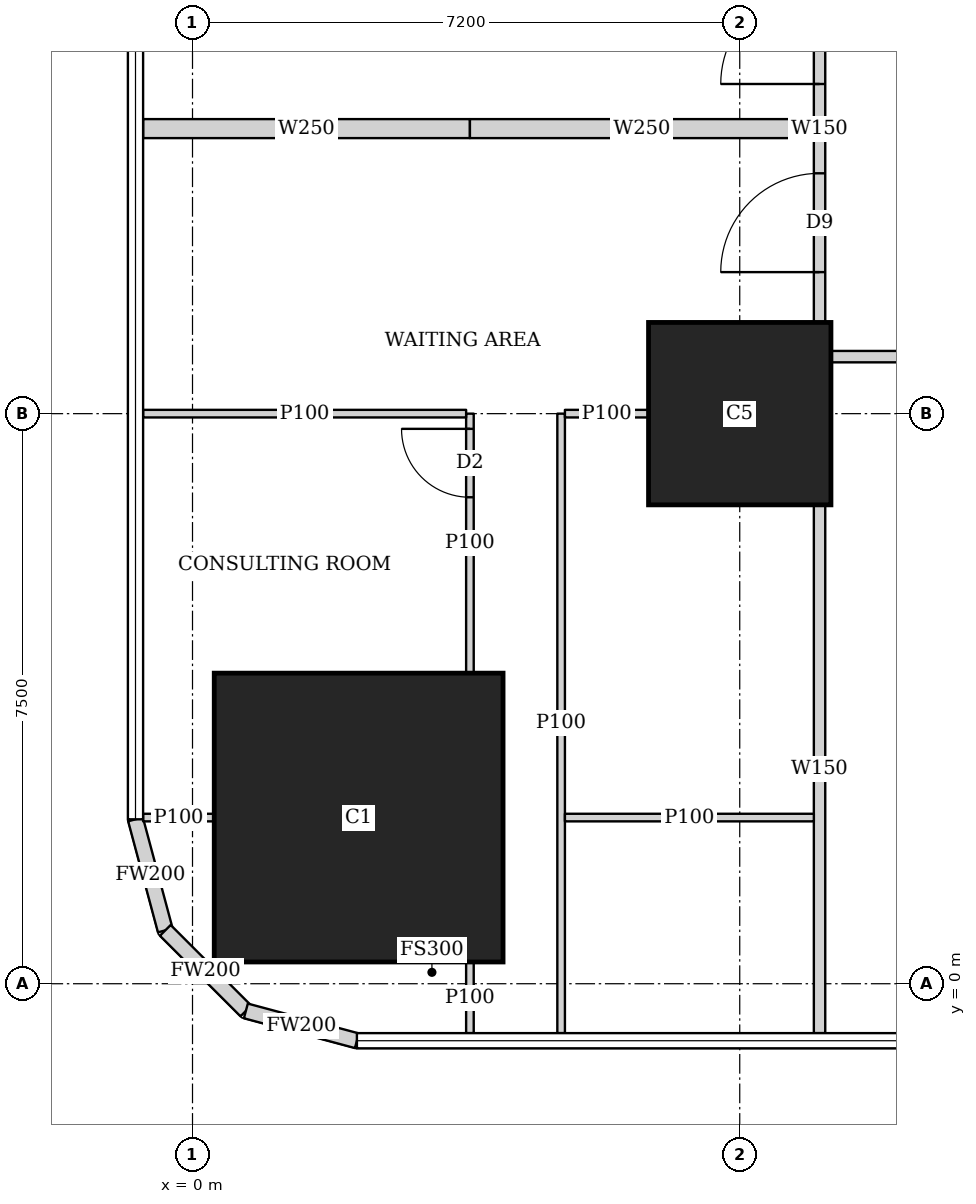
"""IFC4 building model, lengths in metres.
Left out: names, types, materials, properties, quantities, classifications, styles, units other than length and angle.
Written with IfcOpenShell. Run it as: python <this file> out.ifc"""

import sys

from ifc_helpers import new_model, si_unit, direction, frame, frame_2d, origin, origin_2d, place, context, subcontext, project, spatial, rectangle, extrude, element, fill, save


model = new_model("IFC4")
c1 = context("Model", 3, precision=1e-05, world=origin(), true_north=direction((0.0, 1.0)))
c2 = subcontext(c1, "Body", "Model", "MODEL_VIEW")
j1 = project(units=[si_unit("LENGTHUNIT", "METRE"), si_unit("PLANEANGLEUNIT", "RADIAN")], contexts=[c1])
p1 = place(None, origin())
s1 = spatial("IfcSite", under=j1, at=p1, CompositionType="ELEMENT")
p2 = place(p1, origin())
s2 = spatial("IfcBuilding", under=s1, at=p2, CompositionType="ELEMENT")
p3 = place(p2, frame((0.0, 0.0, 5.6)))
s3 = spatial("IfcBuildingStorey", under=s2, at=p3, CompositionType="ELEMENT", Elevation=5.6)
p4 = place(p3, frame((2.186, 2.186, 0.0), z_axis=(0.0, 0.0, 1.0), x_axis=(1.0, 0.0, 0.0)))
e1 = element("IfcColumn", 1, at=p4, inside=s3, PredefinedType="COLUMN", context=c2, shape_type="SweptSolid", body=[
    extrude(rectangle(XDim=3.8, YDim=3.8, at=origin_2d()), origin(), (0.0, 0.0, 1.0), 4.5),
])
p5 = place(p3, frame((7.2, 7.5, 0.0), z_axis=(0.0, 0.0, 1.0), x_axis=(1.0, 0.0, 0.0)))
e2 = element("IfcColumn", 2, at=p5, inside=s3, PredefinedType="COLUMN", context=c2, shape_type="SweptSolid", body=[
    extrude(rectangle(XDim=2.4, YDim=2.4, at=origin_2d()), origin(), (0.0, 0.0, 1.0), 4.5),
])
p6 = place(p3, frame((-0.75, 2.163, 0.0), z_axis=(0.0, 0.0, 1.0), x_axis=(0.259168954497, -0.965832000415, 0.0)))
e3 = element("IfcWall", 3, at=p6, inside=s3, PredefinedType="SOLIDWALL", context=c2, shape_type="SweptSolid", body=[
    extrude(rectangle(XDim=1.513, YDim=0.2, at=frame_2d((0.756, 0.0))), origin(), (0.0, 0.0, 1.0), 4.2),
])
p7 = place(p3, frame((-0.358, 0.702, 0.0), z_axis=(0.0, 0.0, 1.0), x_axis=(0.707106781187, -0.707106781187, 0.0)))
e4 = element("IfcWall", 4, at=p7, inside=s3, PredefinedType="SOLIDWALL", context=c2, shape_type="SweptSolid", body=[
    extrude(rectangle(XDim=1.499, YDim=0.2, at=frame_2d((0.75, 0.0))), origin(), (0.0, 0.0, 1.0), 4.2),
])
p8 = place(p3, frame((0.702, -0.358, 0.0), z_axis=(0.0, 0.0, 1.0), x_axis=(0.965832000415, -0.259168954497, 0.0)))
e5 = element("IfcWall", 5, at=p8, inside=s3, PredefinedType="SOLIDWALL", context=c2, shape_type="SweptSolid", body=[
    extrude(rectangle(XDim=1.513, YDim=0.2, at=frame_2d((0.756, 0.0))), origin(), (0.0, 0.0, 1.0), 4.2),
])
p9 = place(p3, frame((8.25, -0.65, 0.0), z_axis=(0.0, 0.0, 1.0), x_axis=(0.0, 1.0, 0.0)))
e6 = element("IfcWall", 6, at=p9, inside=s3, PredefinedType="SOLIDWALL", context=c2, shape_type="SweptSolid", body=[
    extrude(rectangle(XDim=6.949, YDim=0.15, at=frame_2d((3.475, 0.0))), origin(), (0.0, 0.0, 1.0), 2.4),
])
p10 = place(p3, frame((8.25, 8.701, 0.0), z_axis=(0.0, 0.0, 1.0), x_axis=(0.0, 1.0, 0.0)))
e7 = element("IfcWall", 7, at=p10, inside=s3, PredefinedType="SOLIDWALL", context=c2, shape_type="SweptSolid", body=[
    extrude(rectangle(XDim=5.098, YDim=0.15, at=frame_2d((2.549, 0.0))), origin(), (0.0, 0.0, 1.0), 4.2),
])
p11 = place(p10, frame((0.661, 0.0, 0.0)))
e8 = element("IfcOpeningElement", 8, at=p11, cuts=e7, PredefinedType="OPENING", context=c2, shape_type="SweptSolid", body=[
    extrude(rectangle(XDim=1.3, YDim=2.1, at=frame_2d((0.65, 1.05))), frame((0.0, 0.085, 0.0), z_axis=(0.0, -1.0, 0.0), x_axis=(1.0, 0.0, 0.0)), (0.0, 0.0, 1.0), 0.17),
])
p12 = place(p10, frame((3.136, 0.0, 0.0)))
e9 = element("IfcOpeningElement", 9, at=p12, cuts=e7, PredefinedType="OPENING", context=c2, shape_type="SweptSolid", body=[
    extrude(rectangle(XDim=1.3, YDim=2.1, at=frame_2d((0.65, 1.05))), frame((0.0, 0.085, 0.0), z_axis=(0.0, -1.0, 0.0), x_axis=(1.0, 0.0, 0.0)), (0.0, 0.0, 1.0), 0.17),
])
p13 = place(p3, frame((13.199, 8.25, 0.0), z_axis=(0.0, 0.0, 1.0), x_axis=(-1.0, 0.0, 0.0)))
e10 = element("IfcWall", 10, at=p13, inside=s3, PredefinedType="SOLIDWALL", context=c2, shape_type="SweptSolid", body=[
    extrude(rectangle(XDim=4.798, YDim=0.15, at=frame_2d((2.399, 0.0))), origin(), (0.0, 0.0, 1.0), 2.6),
])
p14 = place(p13, frame((1.224, 0.0, 0.0)))
e11 = element("IfcOpeningElement", 11, at=p14, cuts=e10, PredefinedType="OPENING", context=c2, shape_type="SweptSolid", body=[
    extrude(rectangle(XDim=1.3, YDim=2.1, at=frame_2d((0.65, 1.05))), frame((0.0, 0.085, 0.0), z_axis=(0.0, -1.0, 0.0), x_axis=(1.0, 0.0, 0.0)), (0.0, 0.0, 1.0), 0.17),
])
p15 = place(p3, frame((3.65, -0.65, 0.0), z_axis=(0.0, 0.0, 1.0), x_axis=(0.0, 1.0, 0.0)))
e12 = element("IfcWall", 12, at=p15, inside=s3, PredefinedType="PARTITIONING", context=c2, shape_type="SweptSolid", body=[
    extrude(rectangle(XDim=0.935, YDim=0.1, at=frame_2d((0.467, 0.0))), origin(), (0.0, 0.0, 1.0), 4.2),
])
p16 = place(p3, frame((3.65, 4.087, 0.0), z_axis=(0.0, 0.0, 1.0), x_axis=(0.0, 1.0, 0.0)))
e13 = element("IfcWall", 13, at=p16, inside=s3, PredefinedType="PARTITIONING", context=c2, shape_type="SweptSolid", body=[
    extrude(rectangle(XDim=3.413, YDim=0.1, at=frame_2d((1.707, 0.0))), origin(), (0.0, 0.0, 1.0), 4.2),
])
p17 = place(p16, frame((2.313, 0.0, 0.0)))
e14 = element("IfcOpeningElement", 14, at=p17, cuts=e13, PredefinedType="OPENING", context=c2, shape_type="SweptSolid", body=[
    extrude(rectangle(XDim=0.9, YDim=2.1, at=frame_2d((0.45, 1.05))), frame((0.0, 0.06, 0.0), z_axis=(0.0, -1.0, 0.0), x_axis=(1.0, 0.0, 0.0)), (0.0, 0.0, 1.0), 0.12),
])
p18 = place(p3, frame((4.85, -0.65, 0.0), z_axis=(0.0, 0.0, 1.0), x_axis=(0.0, 1.0, 0.0)))
e15 = element("IfcWall", 15, at=p18, inside=s3, PredefinedType="PARTITIONING", context=c2, shape_type="SweptSolid", body=[
    extrude(rectangle(XDim=8.15, YDim=0.1, at=frame_2d((4.075, 0.0))), origin(), (0.0, 0.0, 1.0), 2.4),
])
p19 = place(p3, frame((-0.65, 2.186, 0.0), z_axis=(0.0, 0.0, 1.0), x_axis=(1.0, 0.0, 0.0)))
e16 = element("IfcWall", 16, at=p19, inside=s3, PredefinedType="PARTITIONING", context=c2, shape_type="SweptSolid", body=[
    extrude(rectangle(XDim=0.935, YDim=0.1, at=frame_2d((0.467, 0.0))), origin(), (0.0, 0.0, 1.0), 4.2),
])
p20 = place(p3, frame((-0.65, 7.5, 0.0), z_axis=(0.0, 0.0, 1.0), x_axis=(1.0, 0.0, 0.0)))
e17 = element("IfcWall", 17, at=p20, inside=s3, PredefinedType="PARTITIONING", context=c2, shape_type="SweptSolid", body=[
    extrude(rectangle(XDim=4.25, YDim=0.1, at=frame_2d((2.125, 0.0))), origin(), (0.0, 0.0, 1.0), 2.4),
])
p21 = place(p3, frame((4.9, 2.186, 0.0), z_axis=(0.0, 0.0, 1.0), x_axis=(1.0, 0.0, 0.0)))
e18 = element("IfcWall", 18, at=p21, inside=s3, PredefinedType="PARTITIONING", context=c2, shape_type="SweptSolid", body=[
    extrude(rectangle(XDim=3.275, YDim=0.1, at=frame_2d((1.638, 0.0))), origin(), (0.0, 0.0, 1.0), 2.4),
])
p22 = place(p3, frame((4.9, 7.5, 0.0), z_axis=(0.0, 0.0, 1.0), x_axis=(1.0, 0.0, 0.0)))
e19 = element("IfcWall", 19, at=p22, inside=s3, PredefinedType="PARTITIONING", context=c2, shape_type="SweptSolid", body=[
    extrude(rectangle(XDim=1.099, YDim=0.1, at=frame_2d((0.55, 0.0))), origin(), (0.0, 0.0, 1.0), 4.2),
])
p23 = place(p3, frame((-0.65, 11.25, 0.0), z_axis=(0.0, 0.0, 1.0), x_axis=(1.0, 0.0, 0.0)))
e20 = element("IfcWall", 20, at=p23, inside=s3, PredefinedType="SOLIDWALL", context=c2, shape_type="SweptSolid", body=[
    extrude(rectangle(XDim=4.3, YDim=0.25, at=frame_2d((2.15, 0.0))), origin(), (0.0, 0.0, 1.0), 2.4),
])
p24 = place(p3, frame((3.65, 11.25, 0.0), z_axis=(0.0, 0.0, 1.0), x_axis=(1.0, 0.0, 0.0)))
e21 = element("IfcWall", 21, at=p24, inside=s3, PredefinedType="SOLIDWALL", context=c2, shape_type="SweptSolid", body=[
    extrude(rectangle(XDim=4.525, YDim=0.25, at=frame_2d((2.263, 0.0))), origin(), (0.0, 0.0, 1.0), 2.6),
])
p25 = place(p17, origin())
e22 = element("IfcDoor", 22, at=p25, inside=s3, OperationType="SINGLE_SWING_RIGHT", PredefinedType="DOOR", context=c2, shape_type="SweptSolid", body=[
    extrude(rectangle(XDim=0.9, YDim=2.1, at=frame_2d((0.45, 1.05))), frame((0.0, 0.025, 0.0), z_axis=(0.0, -1.0, 0.0), x_axis=(1.0, 0.0, 0.0)), (0.0, 0.0, 1.0), 0.05),
])
fill(e14, e22)
p26 = place(p11, origin())
e23 = element("IfcDoor", 23, at=p26, inside=s3, OperationType="DOUBLE_DOOR_SINGLE_SWING", PredefinedType="DOOR", context=c2, shape_type="SweptSolid", body=[
    extrude(rectangle(XDim=1.3, YDim=2.1, at=frame_2d((0.65, 1.05))), frame((0.0, 0.025, 0.0), z_axis=(0.0, -1.0, 0.0), x_axis=(1.0, 0.0, 0.0)), (0.0, 0.0, 1.0), 0.05),
])
fill(e8, e23)
p27 = place(p12, origin())
e24 = element("IfcDoor", 24, at=p27, inside=s3, OperationType="DOUBLE_DOOR_SINGLE_SWING", PredefinedType="DOOR", context=c2, shape_type="SweptSolid", body=[
    extrude(rectangle(XDim=1.3, YDim=2.1, at=frame_2d((0.65, 1.05))), frame((0.0, 0.025, 0.0), z_axis=(0.0, -1.0, 0.0), x_axis=(1.0, 0.0, 0.0)), (0.0, 0.0, 1.0), 0.05),
])
fill(e9, e24)
save(model, sys.argv[1])
